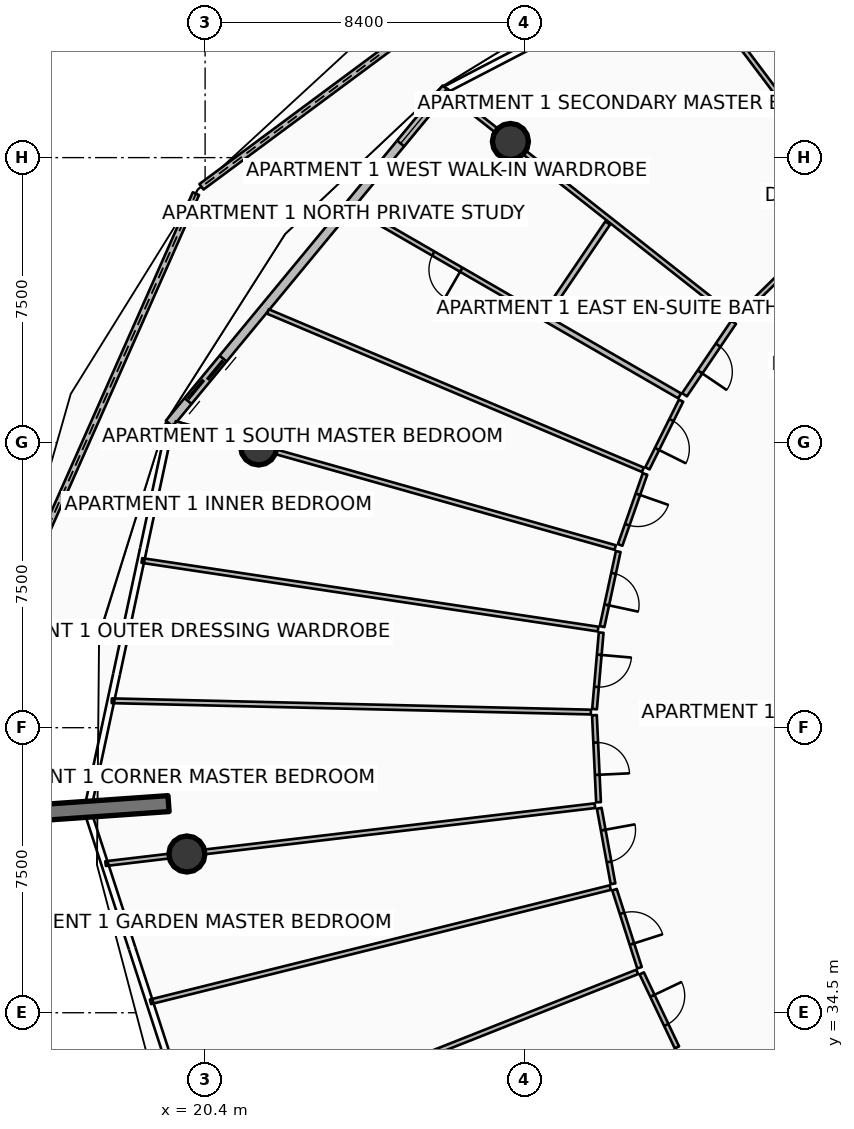
"""IFC4 building model, lengths in metres.
Left out: names, types, materials, properties, quantities, classifications, styles, units other than length and angle.
Written with IfcOpenShell. Run it as: python <this file> out.ifc"""

import sys

from ifc_helpers import new_model, si_unit, direction, frame, frame_2d, origin, origin_2d, place, context, subcontext, project, spatial, polyline, rectangle, circle, outline, extrude, element, fill, save


model = new_model("IFC4")
c1 = context("Model", 3, precision=1e-05, world=origin(), true_north=direction((0.0, 1.0)))
c2 = subcontext(c1, "Body", "Model", "MODEL_VIEW")
j1 = project(units=[si_unit("LENGTHUNIT", "METRE"), si_unit("PLANEANGLEUNIT", "RADIAN")], contexts=[c1])
p1 = place(None, origin())
s1 = spatial("IfcSite", under=j1, at=p1, CompositionType="ELEMENT")
p2 = place(p1, origin())
s2 = spatial("IfcBuilding", under=s1, at=p2, CompositionType="ELEMENT")
p3 = place(p2, frame((0.0, 0.0, 263.65)))
s3 = spatial("IfcBuildingStorey", under=s2, at=p3, CompositionType="ELEMENT", Elevation=263.65)
p4 = place(p3, frame((19.438, 40.003, 0.0), z_axis=(0.0, 0.0, 1.0), x_axis=(-0.997563824095, -0.069759707979, 0.0)))
e1 = element("IfcWall", 1, at=p4, inside=s3, PredefinedType="SOLIDWALL", context=c2, shape_type="SweptSolid", body=[
    extrude(rectangle(XDim=3.5, YDim=0.42, at=frame_2d((1.75, 0.0))), origin(), (0.0, 0.0, 1.0), 3.85),
])
for number, where, z_axis, x_axis in (
    (2, (28.434, 57.425, 0.0), (0.0, 0.0, 1.0), (1.0, 0.0, 0.0)),
    (3, (21.809, 49.387, 0.0), (0.0, 0.0, 1.0), (1.0, 0.0, 0.0)),
    (4, (19.92, 38.677, 0.0), (0.0, 0.0, 1.0), (1.0, 0.0, 0.0)),
):
    element("IfcColumn", number, at=place(p3, frame(where, z_axis=z_axis, x_axis=x_axis)), inside=s3, PredefinedType="COLUMN", context=c2, shape_type="SweptSolid", body=[
        extrude(circle(Radius=0.475, at=origin_2d()), origin(), (0.0, 0.0, 1.0), 3.59),
    ])
p5 = place(p3, frame((29.681, 63.185, 0.0), z_axis=(0.0, 0.0, 1.0), x_axis=(-0.803330402034, -0.59553359701, 0.0)))
e5 = element("IfcWall", 5, at=p5, inside=s3, PredefinedType="PARAPET", context=c2, shape_type="SweptSolid", body=[
    extrude(outline(polyline([(0.0, 0.0), (11.674, 0.0), (11.674, 1.832), (5.837, 1.696), (0.0, 1.497), (0.0, 0.0)])), frame((0.0, 0.09, 0.0), z_axis=(0.0, -1.0, 0.0), x_axis=(1.0, 0.0, 0.0)), (0.0, 0.0, 1.0), 0.18),
])
p6 = place(p3, frame((20.158, 56.052, 0.0), z_axis=(0.0, 0.0, 1.0), x_axis=(-0.405327660322, -0.914171476135, 0.0)))
e6 = element("IfcWall", 6, at=p6, inside=s3, PredefinedType="PARAPET", context=c2, shape_type="SweptSolid", body=[
    extrude(outline(polyline([(0.0, 0.0), (12.323, 0.0), (12.323, 1.756), (6.162, 1.853), (0.0, 1.832), (0.0, 0.0)])), frame((0.0, 0.09, 0.0), z_axis=(0.0, -1.0, 0.0), x_axis=(1.0, 0.0, 0.0)), (0.0, 0.0, 1.0), 0.18),
])
p7 = place(p3, frame((26.742, 58.822, 0.0), z_axis=(0.0, 0.0, 1.0), x_axis=(-0.636680093065, -0.771128043255, 0.0)))
e7 = element("IfcWall", 7, at=p7, inside=s3, PredefinedType="SOLIDWALL", context=c2, shape_type="SweptSolid", body=[
    extrude(rectangle(XDim=11.438, YDim=0.24, at=frame_2d((5.719, 0.0))), origin(), (0.0, 0.0, 1.0), 2.54),
])
p8 = place(p7, frame((9.218, 0.0, 0.0)))
e8 = element("IfcOpeningElement", 8, at=p8, cuts=e7, PredefinedType="OPENING", context=c2, shape_type="SweptSolid", body=[
    extrude(rectangle(XDim=1.45, YDim=2.15, at=frame_2d((0.725, 1.075))), frame((0.0, 0.13, 0.0), z_axis=(0.0, -1.0, 0.0), x_axis=(1.0, 0.0, 0.0)), (0.0, 0.0, 1.0), 0.26),
])
p9 = place(p7, frame((0.28, 0.0, 0.65)))
e9 = element("IfcOpeningElement", 9, at=p9, cuts=e7, PredefinedType="OPENING", context=c2, shape_type="SweptSolid", body=[
    extrude(rectangle(XDim=1.6, YDim=1.5, at=frame_2d((0.8, 0.75))), frame((0.0, 0.13, 0.0), z_axis=(0.0, -1.0, 0.0), x_axis=(1.0, 0.0, 0.0)), (0.0, 0.0, 1.0), 0.26),
])
p10 = place(p3, frame((37.509, 55.949, 0.0), z_axis=(0.0, 0.0, 1.0), x_axis=(-0.60104674722, 0.799213868534, 0.0)))
e10 = element("IfcWall", 10, at=p10, inside=s3, PredefinedType="PARTITIONING", context=c2, shape_type="SweptSolid", body=[
    extrude(rectangle(XDim=7.572, YDim=0.125, at=frame_2d((3.786, 0.0))), origin(), (0.0, 0.0, 1.0), 3.03),
])
p11 = place(p3, frame((37.506, 55.822, 0.0), z_axis=(0.0, 0.0, 1.0), x_axis=(-0.715105814901, -0.699016218334, 0.0)))
e11 = element("IfcWall", 11, at=p11, inside=s3, PredefinedType="PARTITIONING", context=c2, shape_type="SweptSolid", body=[
    extrude(rectangle(XDim=4.294, YDim=0.125, at=frame_2d((2.147, 0.0))), origin(), (0.0, 0.0, 1.0), 2.957),
])
p12 = place(p11, frame((1.697, 0.0, 0.0)))
e12 = element("IfcOpeningElement", 12, at=p12, cuts=e11, PredefinedType="OPENING", context=c2, shape_type="SweptSolid", body=[
    extrude(rectangle(XDim=0.9, YDim=2.08, at=frame_2d((0.45, 1.04))), frame((0.0, 0.073, 0.0), z_axis=(0.0, -1.0, 0.0), x_axis=(1.0, 0.0, 0.0)), (0.0, 0.0, 1.0), 0.145),
])
p13 = place(p3, frame((34.285, 52.812, 0.0), z_axis=(0.0, 0.0, 1.0), x_axis=(-0.785324921183, 0.619083813526, 0.0)))
e13 = element("IfcWall", 13, at=p13, inside=s3, PredefinedType="PARTITIONING", context=c2, shape_type="SweptSolid", body=[
    extrude(rectangle(XDim=9.621, YDim=0.125, at=frame_2d((4.811, 0.0))), origin(), (0.0, 0.0, 1.0), 2.957),
])
p14 = place(p3, frame((34.308, 52.667, 0.0), z_axis=(0.0, 0.0, 1.0), x_axis=(-0.561141072409, -0.827720180288, 0.0)))
e14 = element("IfcWall", 14, at=p14, inside=s3, PredefinedType="PARTITIONING", context=c2, shape_type="SweptSolid", body=[
    extrude(rectangle(XDim=2.303, YDim=0.15, at=frame_2d((1.152, 0.0))), origin(), (0.0, 0.0, 1.0), 2.957),
])
p15 = place(p14, frame((0.727, 0.0, 0.0)))
e15 = element("IfcOpeningElement", 15, at=p15, cuts=e14, PredefinedType="OPENING", context=c2, shape_type="SweptSolid", body=[
    extrude(rectangle(XDim=0.85, YDim=2.06, at=frame_2d((0.425, 1.03))), frame((0.0, 0.085, 0.0), z_axis=(0.0, -1.0, 0.0), x_axis=(1.0, 0.0, 0.0)), (0.0, 0.0, 1.0), 0.17),
])
p16 = place(p3, frame((30.994, 55.28, 0.0), z_axis=(0.0, 0.0, 1.0), x_axis=(-0.561093021969, -0.827752753361, 0.0)))
e16 = element("IfcWall", 16, at=p16, inside=s3, PredefinedType="PARTITIONING", context=c2, shape_type="SweptSolid", body=[
    extrude(rectangle(XDim=2.91, YDim=0.15, at=frame_2d((1.455, 0.0))), origin(), (0.0, 0.0, 1.0), 2.957),
])
p17 = place(p3, frame((32.887, 50.731, 0.0), z_axis=(0.0, 0.0, 1.0), x_axis=(-0.865897249189, 0.500221904605, 0.0)))
e17 = element("IfcWall", 17, at=p17, inside=s3, PredefinedType="PARTITIONING", context=c2, shape_type="SweptSolid", body=[
    extrude(rectangle(XDim=4.09, YDim=0.15, at=frame_2d((2.045, 0.0))), origin(), (0.0, 0.0, 1.0), 3.03),
])
p18 = place(p3, frame((29.233, 52.842, 0.0), z_axis=(0.0, 0.0, 1.0), x_axis=(-0.865885749935, 0.500241809588, 0.0)))
e18 = element("IfcWall", 18, at=p18, inside=s3, PredefinedType="PARTITIONING", context=c2, shape_type="SweptSolid", body=[
    extrude(rectangle(XDim=5.683, YDim=0.125, at=frame_2d((2.841, 0.0))), origin(), (0.0, 0.0, 1.0), 3.03),
])
p19 = place(p18, frame((2.417, 0.0, 0.0)))
e19 = element("IfcOpeningElement", 19, at=p19, cuts=e18, PredefinedType="OPENING", context=c2, shape_type="SweptSolid", body=[
    extrude(rectangle(XDim=0.85, YDim=2.06, at=frame_2d((0.425, 1.03))), frame((0.0, 0.073, 0.0), z_axis=(0.0, -1.0, 0.0), x_axis=(1.0, 0.0, 0.0)), (0.0, 0.0, 1.0), 0.145),
])
p20 = place(p3, frame((31.92, 48.787, 0.0), z_axis=(0.0, 0.0, 1.0), x_axis=(-0.92130726737, 0.388835336731, 0.0)))
e20 = element("IfcWall", 20, at=p20, inside=s3, PredefinedType="PARTITIONING", context=c2, shape_type="SweptSolid", body=[
    extrude(rectangle(XDim=10.712, YDim=0.125, at=frame_2d((5.356, 0.0))), origin(), (0.0, 0.0, 1.0), 3.03),
])
p21 = place(p3, frame((32.925, 50.605, 0.0), z_axis=(0.0, 0.0, 1.0), x_axis=(-0.445446150764, -0.895308732656, 0.0)))
e21 = element("IfcWall", 21, at=p21, inside=s3, PredefinedType="PARTITIONING", context=c2, shape_type="SweptSolid", body=[
    extrude(rectangle(XDim=1.99, YDim=0.125, at=frame_2d((0.995, 0.0))), origin(), (0.0, 0.0, 1.0), 3.03),
])
p22 = place(p21, frame((0.57, 0.0, 0.0)))
e22 = element("IfcOpeningElement", 22, at=p22, cuts=e21, PredefinedType="OPENING", context=c2, shape_type="SweptSolid", body=[
    extrude(rectangle(XDim=0.85, YDim=2.06, at=frame_2d((0.425, 1.03))), frame((0.0, 0.073, 0.0), z_axis=(0.0, -1.0, 0.0), x_axis=(1.0, 0.0, 0.0)), (0.0, 0.0, 1.0), 0.145),
])
p23 = place(p3, frame((31.976, 48.677, 0.0), z_axis=(0.0, 0.0, 1.0), x_axis=(-0.330762244327, -0.943714118644, 0.0)))
e23 = element("IfcWall", 23, at=p23, inside=s3, PredefinedType="PARTITIONING", context=c2, shape_type="SweptSolid", body=[
    extrude(rectangle(XDim=1.98, YDim=0.125, at=frame_2d((0.99, 0.0))), origin(), (0.0, 0.0, 1.0), 2.957),
])
p24 = place(p23, frame((0.565, 0.0, 0.0)))
e24 = element("IfcOpeningElement", 24, at=p24, cuts=e23, PredefinedType="OPENING", context=c2, shape_type="SweptSolid", body=[
    extrude(rectangle(XDim=0.85, YDim=2.06, at=frame_2d((0.425, 1.03))), frame((0.0, 0.073, 0.0), z_axis=(0.0, -1.0, 0.0), x_axis=(1.0, 0.0, 0.0)), (0.0, 0.0, 1.0), 0.145),
])
p25 = place(p3, frame((31.192, 46.74, 0.0), z_axis=(0.0, 0.0, 1.0), x_axis=(-0.962454841417, 0.271441850554, 0.0)))
e25 = element("IfcWall", 25, at=p25, inside=s3, PredefinedType="PARTITIONING", context=c2, shape_type="SweptSolid", body=[
    extrude(rectangle(XDim=12.031, YDim=0.125, at=frame_2d((6.016, 0.0))), origin(), (0.0, 0.0, 1.0), 2.957),
])
p26 = place(p3, frame((30.74, 44.595, 0.0), z_axis=(0.0, 0.0, 1.0), x_axis=(-0.988886285118, 0.148673854813, 0.0)))
e26 = element("IfcWall", 26, at=p26, inside=s3, PredefinedType="PARTITIONING", context=c2, shape_type="SweptSolid", body=[
    extrude(rectangle(XDim=12.139, YDim=0.125, at=frame_2d((6.069, 0.0))), origin(), (0.0, 0.0, 1.0), 3.03),
])
p27 = place(p3, frame((30.551, 42.411, 0.0), z_axis=(0.0, 0.0, 1.0), x_axis=(-0.999722360085, 0.023562740626, 0.0)))
e27 = element("IfcWall", 27, at=p27, inside=s3, PredefinedType="PARTITIONING", context=c2, shape_type="SweptSolid", body=[
    extrude(rectangle(XDim=12.61, YDim=0.125, at=frame_2d((6.305, 0.0))), origin(), (0.0, 0.0, 1.0), 3.03),
])
p28 = place(p3, frame((31.271, 46.635, 0.0), z_axis=(0.0, 0.0, 1.0), x_axis=(-0.210477911791, -0.97759861326, 0.0)))
e28 = element("IfcWall", 28, at=p28, inside=s3, PredefinedType="PARTITIONING", context=c2, shape_type="SweptSolid", body=[
    extrude(rectangle(XDim=2.021, YDim=0.125, at=frame_2d((1.01, 0.0))), origin(), (0.0, 0.0, 1.0), 2.957),
])
p29 = place(p28, frame((0.585, 0.0, 0.0)))
e29 = element("IfcOpeningElement", 29, at=p29, cuts=e28, PredefinedType="OPENING", context=c2, shape_type="SweptSolid", body=[
    extrude(rectangle(XDim=0.85, YDim=2.06, at=frame_2d((0.425, 1.03))), frame((0.0, 0.073, 0.0), z_axis=(0.0, -1.0, 0.0), x_axis=(1.0, 0.0, 0.0)), (0.0, 0.0, 1.0), 0.145),
])
p30 = place(p3, frame((30.822, 44.502, 0.0), z_axis=(0.0, 0.0, 1.0), x_axis=(-0.086275045339, -0.996271356886, 0.0)))
e30 = element("IfcWall", 30, at=p30, inside=s3, PredefinedType="PARTITIONING", context=c2, shape_type="SweptSolid", body=[
    extrude(rectangle(XDim=2.021, YDim=0.125, at=frame_2d((1.01, 0.0))), origin(), (0.0, 0.0, 1.0), 3.03),
])
p31 = place(p30, frame((0.585, 0.0, 0.0)))
e31 = element("IfcOpeningElement", 31, at=p31, cuts=e30, PredefinedType="OPENING", context=c2, shape_type="SweptSolid", body=[
    extrude(rectangle(XDim=0.85, YDim=2.06, at=frame_2d((0.425, 1.03))), frame((0.0, 0.073, 0.0), z_axis=(0.0, -1.0, 0.0), x_axis=(1.0, 0.0, 0.0)), (0.0, 0.0, 1.0), 0.145),
])
p32 = place(p3, frame((30.645, 42.329, 0.0), z_axis=(0.0, 0.0, 1.0), x_axis=(0.047175561804, -0.998886613369, 0.0)))
e32 = element("IfcWall", 32, at=p32, inside=s3, PredefinedType="PARTITIONING", context=c2, shape_type="SweptSolid", body=[
    extrude(rectangle(XDim=2.292, YDim=0.125, at=frame_2d((1.146, 0.0))), origin(), (0.0, 0.0, 1.0), 2.957),
])
p33 = place(p32, frame((0.721, 0.0, 0.0)))
e33 = element("IfcOpeningElement", 33, at=p33, cuts=e32, PredefinedType="OPENING", context=c2, shape_type="SweptSolid", body=[
    extrude(rectangle(XDim=0.85, YDim=2.06, at=frame_2d((0.425, 1.03))), frame((0.0, 0.073, 0.0), z_axis=(0.0, -1.0, 0.0), x_axis=(1.0, 0.0, 0.0)), (0.0, 0.0, 1.0), 0.145),
])
p34 = place(p3, frame((30.657, 39.947, 0.0), z_axis=(0.0, 0.0, 1.0), x_axis=(-0.99306861519, -0.117536060525, 0.0)))
e34 = element("IfcWall", 34, at=p34, inside=s3, PredefinedType="PARTITIONING", context=c2, shape_type="SweptSolid", body=[
    extrude(rectangle(XDim=12.966, YDim=0.125, at=frame_2d((6.483, 0.0))), origin(), (0.0, 0.0, 1.0), 2.957),
])
p35 = place(p3, frame((31.061, 37.792, 0.0), z_axis=(0.0, 0.0, 1.0), x_axis=(-0.970505468857, -0.241079105105, 0.0)))
e35 = element("IfcWall", 35, at=p35, inside=s3, PredefinedType="PARTITIONING", context=c2, shape_type="SweptSolid", body=[
    extrude(rectangle(XDim=12.465, YDim=0.125, at=frame_2d((6.233, 0.0))), origin(), (0.0, 0.0, 1.0), 3.03),
])
p36 = place(p3, frame((31.772, 35.575, 0.0), z_axis=(0.0, 0.0, 1.0), x_axis=(-0.929777389871, -0.368122269476, 0.0)))
e36 = element("IfcWall", 36, at=p36, inside=s3, PredefinedType="PARTITIONING", context=c2, shape_type="SweptSolid", body=[
    extrude(rectangle(XDim=12.45, YDim=0.125, at=frame_2d((6.225, 0.0))), origin(), (0.0, 0.0, 1.0), 3.03),
])
p37 = place(p3, frame((30.771, 39.88, 0.0), z_axis=(0.0, 0.0, 1.0), x_axis=(0.17966153972, -0.983728484464, 0.0)))
e37 = element("IfcWall", 37, at=p37, inside=s3, PredefinedType="PARTITIONING", context=c2, shape_type="SweptSolid", body=[
    extrude(rectangle(XDim=2.021, YDim=0.125, at=frame_2d((1.01, 0.0))), origin(), (0.0, 0.0, 1.0), 2.957),
])
p38 = place(p37, frame((0.585, 0.0, 0.0)))
e38 = element("IfcOpeningElement", 38, at=p38, cuts=e37, PredefinedType="OPENING", context=c2, shape_type="SweptSolid", body=[
    extrude(rectangle(XDim=0.85, YDim=2.06, at=frame_2d((0.425, 1.03))), frame((0.0, 0.073, 0.0), z_axis=(0.0, -1.0, 0.0), x_axis=(1.0, 0.0, 0.0)), (0.0, 0.0, 1.0), 0.145),
])
p39 = place(p3, frame((31.173, 37.738, 0.0), z_axis=(0.0, 0.0, 1.0), x_axis=(0.305305543728, -0.952254443397, 0.0)))
e39 = element("IfcWall", 39, at=p39, inside=s3, PredefinedType="PARTITIONING", context=c2, shape_type="SweptSolid", body=[
    extrude(rectangle(XDim=2.157, YDim=0.125, at=frame_2d((1.078, 0.0))), origin(), (0.0, 0.0, 1.0), 3.03),
])
p40 = place(p39, frame((0.653, 0.0, 0.0)))
e40 = element("IfcOpeningElement", 40, at=p40, cuts=e39, PredefinedType="OPENING", context=c2, shape_type="SweptSolid", body=[
    extrude(rectangle(XDim=0.85, YDim=2.06, at=frame_2d((0.425, 1.03))), frame((0.0, 0.073, 0.0), z_axis=(0.0, -1.0, 0.0), x_axis=(1.0, 0.0, 0.0)), (0.0, 0.0, 1.0), 0.145),
])
p41 = place(p3, frame((31.89, 35.536, 0.0), z_axis=(0.0, 0.0, 1.0), x_axis=(0.429375439277, -0.90312608873, 0.0)))
e41 = element("IfcWall", 41, at=p41, inside=s3, PredefinedType="PARTITIONING", context=c2, shape_type="SweptSolid", body=[
    extrude(rectangle(XDim=2.157, YDim=0.125, at=frame_2d((1.078, 0.0))), origin(), (0.0, 0.0, 1.0), 2.957),
])
p42 = place(p41, frame((0.653, 0.0, 0.0)))
e42 = element("IfcOpeningElement", 42, at=p42, cuts=e41, PredefinedType="OPENING", context=c2, shape_type="SweptSolid", body=[
    extrude(rectangle(XDim=0.85, YDim=2.06, at=frame_2d((0.425, 1.03))), frame((0.0, 0.073, 0.0), z_axis=(0.0, -1.0, 0.0), x_axis=(1.0, 0.0, 0.0)), (0.0, 0.0, 1.0), 0.145),
])
p43 = place(p8, origin())
e43 = element("IfcDoor", 43, at=p43, inside=s3, OperationType="DOUBLE_DOOR_SLIDING", PredefinedType="DOOR", context=c2, shape_type="SweptSolid", body=[
    extrude(rectangle(XDim=1.45, YDim=2.15, at=frame_2d((0.725, 1.075))), frame((0.0, 0.025, 0.0), z_axis=(0.0, -1.0, 0.0), x_axis=(1.0, 0.0, 0.0)), (0.0, 0.0, 1.0), 0.05),
])
fill(e8, e43)
p44 = place(p9, origin())
e44 = element("IfcWindow", 44, at=p44, inside=s3, PartitioningType="SINGLE_PANEL", PredefinedType="WINDOW", context=c2, shape_type="SweptSolid", body=[
    extrude(rectangle(XDim=1.6, YDim=1.5, at=frame_2d((0.8, 0.75))), frame((0.0, 0.03, 0.0), z_axis=(0.0, -1.0, 0.0), x_axis=(1.0, 0.0, 0.0)), (0.0, 0.0, 1.0), 0.06),
])
fill(e9, e44)
p45 = place(p15, origin())
e45 = element("IfcDoor", 45, at=p45, inside=s3, OperationType="SINGLE_SWING_RIGHT", PredefinedType="DOOR", context=c2, shape_type="SweptSolid", body=[
    extrude(rectangle(XDim=0.85, YDim=2.06, at=frame_2d((0.425, 1.03))), frame((0.0, 0.025, 0.0), z_axis=(0.0, -1.0, 0.0), x_axis=(1.0, 0.0, 0.0)), (0.0, 0.0, 1.0), 0.05),
])
fill(e15, e45)
p46 = place(p19, origin())
e46 = element("IfcDoor", 46, at=p46, inside=s3, OperationType="SINGLE_SWING_LEFT", PredefinedType="DOOR", context=c2, shape_type="SweptSolid", body=[
    extrude(rectangle(XDim=0.85, YDim=2.06, at=frame_2d((0.425, 1.03))), frame((0.0, 0.025, 0.0), z_axis=(0.0, -1.0, 0.0), x_axis=(1.0, 0.0, 0.0)), (0.0, 0.0, 1.0), 0.05),
])
fill(e19, e46)
p47 = place(p22, origin())
e47 = element("IfcDoor", 47, at=p47, inside=s3, OperationType="SINGLE_SWING_RIGHT", PredefinedType="DOOR", context=c2, shape_type="SweptSolid", body=[
    extrude(rectangle(XDim=0.85, YDim=2.06, at=frame_2d((0.425, 1.03))), frame((0.0, 0.025, 0.0), z_axis=(0.0, -1.0, 0.0), x_axis=(1.0, 0.0, 0.0)), (0.0, 0.0, 1.0), 0.05),
])
fill(e22, e47)
p48 = place(p24, origin())
e48 = element("IfcDoor", 48, at=p48, inside=s3, OperationType="SINGLE_SWING_LEFT", PredefinedType="DOOR", context=c2, shape_type="SweptSolid", body=[
    extrude(rectangle(XDim=0.85, YDim=2.06, at=frame_2d((0.425, 1.03))), frame((0.0, 0.025, 0.0), z_axis=(0.0, -1.0, 0.0), x_axis=(1.0, 0.0, 0.0)), (0.0, 0.0, 1.0), 0.05),
])
fill(e24, e48)
p49 = place(p29, origin())
e49 = element("IfcDoor", 49, at=p49, inside=s3, OperationType="SINGLE_SWING_RIGHT", PredefinedType="DOOR", context=c2, shape_type="SweptSolid", body=[
    extrude(rectangle(XDim=0.85, YDim=2.06, at=frame_2d((0.425, 1.03))), frame((0.0, 0.025, 0.0), z_axis=(0.0, -1.0, 0.0), x_axis=(1.0, 0.0, 0.0)), (0.0, 0.0, 1.0), 0.05),
])
fill(e29, e49)
p50 = place(p31, origin())
e50 = element("IfcDoor", 50, at=p50, inside=s3, OperationType="SINGLE_SWING_LEFT", PredefinedType="DOOR", context=c2, shape_type="SweptSolid", body=[
    extrude(rectangle(XDim=0.85, YDim=2.06, at=frame_2d((0.425, 1.03))), frame((0.0, 0.025, 0.0), z_axis=(0.0, -1.0, 0.0), x_axis=(1.0, 0.0, 0.0)), (0.0, 0.0, 1.0), 0.05),
])
fill(e31, e50)
p51 = place(p33, origin())
e51 = element("IfcDoor", 51, at=p51, inside=s3, OperationType="SINGLE_SWING_RIGHT", PredefinedType="DOOR", context=c2, shape_type="SweptSolid", body=[
    extrude(rectangle(XDim=0.85, YDim=2.06, at=frame_2d((0.425, 1.03))), frame((0.0, 0.025, 0.0), z_axis=(0.0, -1.0, 0.0), x_axis=(1.0, 0.0, 0.0)), (0.0, 0.0, 1.0), 0.05),
])
fill(e33, e51)
p52 = place(p38, origin())
e52 = element("IfcDoor", 52, at=p52, inside=s3, OperationType="SINGLE_SWING_LEFT", PredefinedType="DOOR", context=c2, shape_type="SweptSolid", body=[
    extrude(rectangle(XDim=0.85, YDim=2.06, at=frame_2d((0.425, 1.03))), frame((0.0, 0.025, 0.0), z_axis=(0.0, -1.0, 0.0), x_axis=(1.0, 0.0, 0.0)), (0.0, 0.0, 1.0), 0.05),
])
fill(e38, e52)
p53 = place(p40, origin())
e53 = element("IfcDoor", 53, at=p53, inside=s3, OperationType="SINGLE_SWING_RIGHT", PredefinedType="DOOR", context=c2, shape_type="SweptSolid", body=[
    extrude(rectangle(XDim=0.85, YDim=2.06, at=frame_2d((0.425, 1.03))), frame((0.0, 0.025, 0.0), z_axis=(0.0, -1.0, 0.0), x_axis=(1.0, 0.0, 0.0)), (0.0, 0.0, 1.0), 0.05),
])
fill(e40, e53)
p54 = place(p42, origin())
e54 = element("IfcDoor", 54, at=p54, inside=s3, OperationType="SINGLE_SWING_LEFT", PredefinedType="DOOR", context=c2, shape_type="SweptSolid", body=[
    extrude(rectangle(XDim=0.85, YDim=2.06, at=frame_2d((0.425, 1.03))), frame((0.0, 0.025, 0.0), z_axis=(0.0, -1.0, 0.0), x_axis=(1.0, 0.0, 0.0)), (0.0, 0.0, 1.0), 0.05),
])
fill(e42, e54)
save(model, sys.argv[1])
